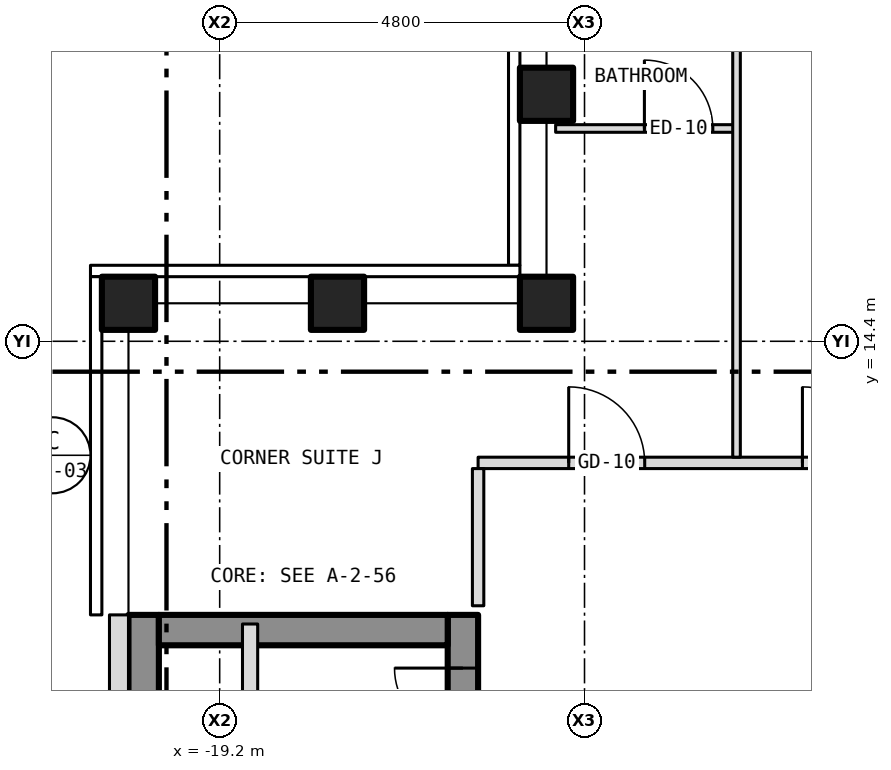
"""IFC4 building model, lengths in metres.
Left out: names, types, materials, properties, quantities, classifications, styles, units other than length and angle.
Written with IfcOpenShell. Run it as: python <this file> out.ifc"""

import sys

from ifc_helpers import new_model, si_unit, direction, frame, frame_2d, origin, origin_2d, place, context, subcontext, project, spatial, rectangle, hollow_rectangle, extrude, element, fill, save


model = new_model("IFC4")
c1 = context("Model", 3, precision=1e-05, world=origin(), true_north=direction((0.0, 1.0)))
c2 = subcontext(c1, "Body", "Model", "MODEL_VIEW")
j1 = project(units=[si_unit("LENGTHUNIT", "METRE"), si_unit("PLANEANGLEUNIT", "RADIAN")], contexts=[c1])
p1 = place(None, origin())
s1 = spatial("IfcSite", under=j1, at=p1, CompositionType="ELEMENT")
p2 = place(p1, origin())
s2 = spatial("IfcBuilding", under=s1, at=p2, CompositionType="ELEMENT")
p3 = place(p2, frame((0.0, 0.0, 205.0)))
s3 = spatial("IfcBuildingStorey", under=s2, at=p3, CompositionType="ELEMENT", Elevation=205.0)
for number, where, z_axis, x_axis in (
    (1, (-20.4, 14.9, -0.15), (0.0, 0.0, 1.0), (1.0, 0.0, 0.0)),
    (2, (-14.9, 14.9, -0.15), (0.0, 0.0, 1.0), (1.0, 0.0, 0.0)),
    (3, (-14.9, 17.65, -0.15), (0.0, 0.0, 1.0), (1.0, 0.0, 0.0)),
    (4, (-17.65, 14.9, -0.15), (0.0, 0.0, 1.0), (1.0, 0.0, 0.0)),
):
    element("IfcColumn", number, at=place(p3, frame(where, z_axis=z_axis, x_axis=x_axis)), inside=s3, PredefinedType="COLUMN", context=c2, shape_type="SweptSolid", body=[
        extrude(hollow_rectangle(XDim=0.7, YDim=0.7, WallThickness=0.04, at=origin_2d()), origin(), (0.0, 0.0, 1.0), 3.5),
    ])
p4 = place(p3, frame((-16.0, -10.8, 0.0), z_axis=(0.0, 0.0, 1.0), x_axis=(0.0, 1.0, 0.0)))
e5 = element("IfcWall", 5, at=p4, inside=s3, PredefinedType="SHEAR", context=c2, shape_type="SweptSolid", body=[
    extrude(rectangle(XDim=21.6, YDim=0.4, at=frame_2d((10.8, 0.0))), origin(), (0.0, 0.0, 1.0), 3.25),
])
p5 = place(p4, frame((9.4, 0.0, 0.0)))
e6 = element("IfcOpeningElement", 6, at=p5, cuts=e5, PredefinedType="OPENING", context=c2, shape_type="SweptSolid", body=[
    extrude(rectangle(XDim=1.1, YDim=2.1, at=frame_2d((0.55, 1.05))), frame((0.0, 0.212, 0.0), z_axis=(0.0, -1.0, 0.0), x_axis=(1.0, 0.0, 0.0)), (0.0, 0.0, 1.0), 0.424),
])
p6 = place(p4, frame((11.5, 0.0, 0.0)))
e7 = element("IfcOpeningElement", 7, at=p6, cuts=e5, PredefinedType="OPENING", context=c2, shape_type="SweptSolid", body=[
    extrude(rectangle(XDim=1.1, YDim=2.1, at=frame_2d((0.55, 1.05))), frame((0.0, 0.212, 0.0), z_axis=(0.0, -1.0, 0.0), x_axis=(1.0, 0.0, 0.0)), (0.0, 0.0, 1.0), 0.424),
])
p7 = place(p4, frame((13.6, 0.0, 0.0)))
e8 = element("IfcOpeningElement", 8, at=p7, cuts=e5, PredefinedType="OPENING", context=c2, shape_type="SweptSolid", body=[
    extrude(rectangle(XDim=1.1, YDim=2.1, at=frame_2d((0.55, 1.05))), frame((0.0, 0.212, 0.0), z_axis=(0.0, -1.0, 0.0), x_axis=(1.0, 0.0, 0.0)), (0.0, 0.0, 1.0), 0.424),
])
p8 = place(p4, frame((15.7, 0.0, 0.0)))
e9 = element("IfcOpeningElement", 9, at=p8, cuts=e5, PredefinedType="OPENING", context=c2, shape_type="SweptSolid", body=[
    extrude(rectangle(XDim=1.1, YDim=2.1, at=frame_2d((0.55, 1.05))), frame((0.0, 0.212, 0.0), z_axis=(0.0, -1.0, 0.0), x_axis=(1.0, 0.0, 0.0)), (0.0, 0.0, 1.0), 0.424),
])
p9 = place(p4, frame((17.8, 0.0, 0.0)))
e10 = element("IfcOpeningElement", 10, at=p9, cuts=e5, PredefinedType="OPENING", context=c2, shape_type="SweptSolid", body=[
    extrude(rectangle(XDim=1.1, YDim=2.1, at=frame_2d((0.55, 1.05))), frame((0.0, 0.212, 0.0), z_axis=(0.0, -1.0, 0.0), x_axis=(1.0, 0.0, 0.0)), (0.0, 0.0, 1.0), 0.424),
])
p10 = place(p4, frame((0.458, 0.0, 0.0)))
e11 = element("IfcOpeningElement", 11, at=p10, cuts=e5, PredefinedType="OPENING", context=c2, shape_type="SweptSolid", body=[
    extrude(rectangle(XDim=1.1, YDim=2.1, at=frame_2d((0.55, 1.05))), frame((0.0, 0.212, 0.0), z_axis=(0.0, -1.0, 0.0), x_axis=(1.0, 0.0, 0.0)), (0.0, 0.0, 1.0), 0.424),
])
p11 = place(p4, frame((7.5, 0.0, 0.0)))
e12 = element("IfcOpeningElement", 12, at=p11, cuts=e5, PredefinedType="OPENING", context=c2, shape_type="SweptSolid", body=[
    extrude(rectangle(XDim=1.1, YDim=2.1, at=frame_2d((0.55, 1.05))), frame((0.0, 0.212, 0.0), z_axis=(0.0, -1.0, 0.0), x_axis=(1.0, 0.0, 0.0)), (0.0, 0.0, 1.0), 0.424),
])
p12 = place(p4, frame((20.0, 0.0, 0.0)))
e13 = element("IfcOpeningElement", 13, at=p12, cuts=e5, PredefinedType="OPENING", context=c2, shape_type="SweptSolid", body=[
    extrude(rectangle(XDim=0.9, YDim=2.1, at=frame_2d((0.45, 1.05))), frame((0.0, 0.212, 0.0), z_axis=(0.0, -1.0, 0.0), x_axis=(1.0, 0.0, 0.0)), (0.0, 0.0, 1.0), 0.424),
])
p13 = place(p3, frame((-20.2, -10.8, 0.0), z_axis=(0.0, 0.0, 1.0), x_axis=(0.0, 1.0, 0.0)))
e14 = element("IfcWall", 14, at=p13, inside=s3, PredefinedType="SHEAR", context=c2, shape_type="SweptSolid", body=[
    extrude(rectangle(XDim=21.6, YDim=0.4, at=frame_2d((10.8, 0.0))), origin(), (0.0, 0.0, 1.0), 3.25),
])
p14 = place(p3, frame((-20.0, 10.6, 0.0), z_axis=(0.0, 0.0, 1.0), x_axis=(1.0, 0.0, 0.0)))
e15 = element("IfcWall", 15, at=p14, inside=s3, PredefinedType="SHEAR", context=c2, shape_type="SweptSolid", body=[
    extrude(rectangle(XDim=3.8, YDim=0.4, at=frame_2d((1.9, 0.0))), origin(), (0.0, 0.0, 1.0), 3.25),
])
p15 = place(p3, frame((-20.525, 10.8, 0.0), z_axis=(0.0, 0.0, 1.0), x_axis=(0.0, -1.0, 0.0)))
e16 = element("IfcWall", 16, at=p15, inside=s3, PredefinedType="SOLIDWALL", context=c2, shape_type="SweptSolid", body=[
    extrude(rectangle(XDim=21.6, YDim=0.25, at=frame_2d((10.8, 0.0))), origin(), (0.0, 0.0, 1.0), 3.5),
])
p16 = place(p15, frame((18.05, 0.0, 1.0)))
e17 = element("IfcOpeningElement", 17, at=p16, cuts=e16, PredefinedType="OPENING", context=c2, shape_type="SweptSolid", body=[
    extrude(rectangle(XDim=0.6, YDim=1.5, at=frame_2d((0.3, 0.75))), frame((0.0, 0.137, 0.0), z_axis=(0.0, -1.0, 0.0), x_axis=(1.0, 0.0, 0.0)), (0.0, 0.0, 1.0), 0.274),
])
p17 = place(p3, frame((-15.8, 12.8, 0.0), z_axis=(0.0, 0.0, 1.0), x_axis=(1.0, 0.0, 0.0)))
e18 = element("IfcWall", 18, at=p17, inside=s3, PredefinedType="PARTITIONING", context=c2, shape_type="SweptSolid", body=[
    extrude(rectangle(XDim=31.6, YDim=0.15, at=frame_2d((15.8, 0.0))), origin(), (0.0, 0.0, 1.0), 3.35),
])
p18 = place(p17, frame((4.267, 0.0, 0.0)))
e19 = element("IfcOpeningElement", 19, at=p18, cuts=e18, PredefinedType="OPENING", context=c2, shape_type="SweptSolid", body=[
    extrude(rectangle(XDim=1.0, YDim=2.1, at=frame_2d((0.5, 1.05))), frame((0.0, 0.087, 0.0), z_axis=(0.0, -1.0, 0.0), x_axis=(1.0, 0.0, 0.0)), (0.0, 0.0, 1.0), 0.174),
])
p19 = place(p17, frame((12.675, 0.0, 0.0)))
e20 = element("IfcOpeningElement", 20, at=p19, cuts=e18, PredefinedType="OPENING", context=c2, shape_type="SweptSolid", body=[
    extrude(rectangle(XDim=1.0, YDim=2.1, at=frame_2d((0.5, 1.05))), frame((0.0, 0.087, 0.0), z_axis=(0.0, -1.0, 0.0), x_axis=(1.0, 0.0, 0.0)), (0.0, 0.0, 1.0), 0.174),
])
p20 = place(p17, frame((16.684, 0.0, 0.0)))
e21 = element("IfcOpeningElement", 21, at=p20, cuts=e18, PredefinedType="OPENING", context=c2, shape_type="SweptSolid", body=[
    extrude(rectangle(XDim=1.0, YDim=2.1, at=frame_2d((0.5, 1.05))), frame((0.0, 0.087, 0.0), z_axis=(0.0, -1.0, 0.0), x_axis=(1.0, 0.0, 0.0)), (0.0, 0.0, 1.0), 0.174),
])
p21 = place(p17, frame((25.092, 0.0, 0.0)))
e22 = element("IfcOpeningElement", 22, at=p21, cuts=e18, PredefinedType="OPENING", context=c2, shape_type="SweptSolid", body=[
    extrude(rectangle(XDim=1.0, YDim=2.1, at=frame_2d((0.5, 1.05))), frame((0.0, 0.087, 0.0), z_axis=(0.0, -1.0, 0.0), x_axis=(1.0, 0.0, 0.0)), (0.0, 0.0, 1.0), 0.174),
])
p22 = place(p17, frame((1.192, 0.0, 0.0)))
e23 = element("IfcOpeningElement", 23, at=p22, cuts=e18, PredefinedType="OPENING", context=c2, shape_type="SweptSolid", body=[
    extrude(rectangle(XDim=1.0, YDim=2.1, at=frame_2d((0.5, 1.05))), frame((0.0, 0.087, 0.0), z_axis=(0.0, -1.0, 0.0), x_axis=(1.0, 0.0, 0.0)), (0.0, 0.0, 1.0), 0.174),
])
p23 = place(p17, frame((29.409, 0.0, 0.0)))
e24 = element("IfcOpeningElement", 24, at=p23, cuts=e18, PredefinedType="OPENING", context=c2, shape_type="SweptSolid", body=[
    extrude(rectangle(XDim=1.0, YDim=2.1, at=frame_2d((0.5, 1.05))), frame((0.0, 0.087, 0.0), z_axis=(0.0, -1.0, 0.0), x_axis=(1.0, 0.0, 0.0)), (0.0, 0.0, 1.0), 0.174),
])
p24 = place(p3, frame((-14.78, 17.2, 0.0), z_axis=(0.0, 0.0, 1.0), x_axis=(1.0, 0.0, 0.0)))
e25 = element("IfcWall", 25, at=p24, inside=s3, PredefinedType="PARTITIONING", context=c2, shape_type="SweptSolid", body=[
    extrude(rectangle(XDim=2.38, YDim=0.1, at=frame_2d((1.19, 0.0))), origin(), (0.0, 0.0, 1.0), 3.35),
])
p25 = place(p24, frame((1.168, 0.0, 0.0)))
e26 = element("IfcOpeningElement", 26, at=p25, cuts=e25, PredefinedType="OPENING", context=c2, shape_type="SweptSolid", body=[
    extrude(rectangle(XDim=0.9, YDim=2.1, at=frame_2d((0.45, 1.05))), frame((0.0, 0.062, 0.0), z_axis=(0.0, -1.0, 0.0), x_axis=(1.0, 0.0, 0.0)), (0.0, 0.0, 1.0), 0.124),
])
p26 = place(p3, frame((-18.8, -1.8, 0.0), z_axis=(0.0, 0.0, 1.0), x_axis=(0.0, 1.0, 0.0)))
e27 = element("IfcWall", 27, at=p26, inside=s3, PredefinedType="PARTITIONING", context=c2, shape_type="SweptSolid", body=[
    extrude(rectangle(XDim=12.48, YDim=0.2, at=frame_2d((6.24, 0.0))), origin(), (0.0, 0.0, 1.0), 3.25),
])
p27 = place(p3, frame((-15.8, 10.92, 0.0), z_axis=(0.0, 0.0, 1.0), x_axis=(0.0, 1.0, 0.0)))
e28 = element("IfcWall", 28, at=p27, inside=s3, PredefinedType="PARTITIONING", context=c2, shape_type="SweptSolid", body=[
    extrude(rectangle(XDim=1.805, YDim=0.15, at=frame_2d((0.903, 0.0))), origin(), (0.0, 0.0, 1.0), 3.35),
])
p28 = place(p3, frame((-12.4, 12.875, 0.0), z_axis=(0.0, 0.0, 1.0), x_axis=(0.0, 1.0, 0.0)))
e29 = element("IfcWall", 29, at=p28, inside=s3, PredefinedType="PARTITIONING", context=c2, shape_type="SweptSolid", body=[
    extrude(rectangle(XDim=7.905, YDim=0.1, at=frame_2d((3.953, 0.0))), origin(), (0.0, 0.0, 1.0), 3.35),
])
p29 = place(p12, origin())
e30 = element("IfcDoor", 30, at=p29, inside=s3, OperationType="SINGLE_SWING_RIGHT", PredefinedType="DOOR", context=c2, shape_type="SweptSolid", body=[
    extrude(rectangle(XDim=0.9, YDim=2.1, at=frame_2d((0.45, 1.05))), frame((0.0, 0.025, 0.0), z_axis=(0.0, -1.0, 0.0), x_axis=(1.0, 0.0, 0.0)), (0.0, 0.0, 1.0), 0.05),
])
fill(e13, e30)
p30 = place(p18, origin())
e31 = element("IfcDoor", 31, at=p30, inside=s3, OperationType="SINGLE_SWING_LEFT", PredefinedType="DOOR", context=c2, shape_type="SweptSolid", body=[
    extrude(rectangle(XDim=1.0, YDim=2.1, at=frame_2d((0.5, 1.05))), frame((0.0, 0.025, 0.0), z_axis=(0.0, -1.0, 0.0), x_axis=(1.0, 0.0, 0.0)), (0.0, 0.0, 1.0), 0.05),
])
fill(e19, e31)
p31 = place(p25, origin())
e32 = element("IfcDoor", 32, at=p31, inside=s3, OperationType="SINGLE_SWING_LEFT", PredefinedType="DOOR", context=c2, shape_type="SweptSolid", body=[
    extrude(rectangle(XDim=0.9, YDim=2.1, at=frame_2d((0.45, 1.05))), frame((0.0, 0.025, 0.0), z_axis=(0.0, -1.0, 0.0), x_axis=(1.0, 0.0, 0.0)), (0.0, 0.0, 1.0), 0.05),
])
fill(e26, e32)
p32 = place(p22, origin())
e33 = element("IfcDoor", 33, at=p32, inside=s3, OperationType="SINGLE_SWING_LEFT", PredefinedType="DOOR", context=c2, shape_type="SweptSolid", body=[
    extrude(rectangle(XDim=1.0, YDim=2.1, at=frame_2d((0.5, 1.05))), frame((0.0, 0.025, 0.0), z_axis=(0.0, -1.0, 0.0), x_axis=(1.0, 0.0, 0.0)), (0.0, 0.0, 1.0), 0.05),
])
fill(e23, e33)
save(model, sys.argv[1])
